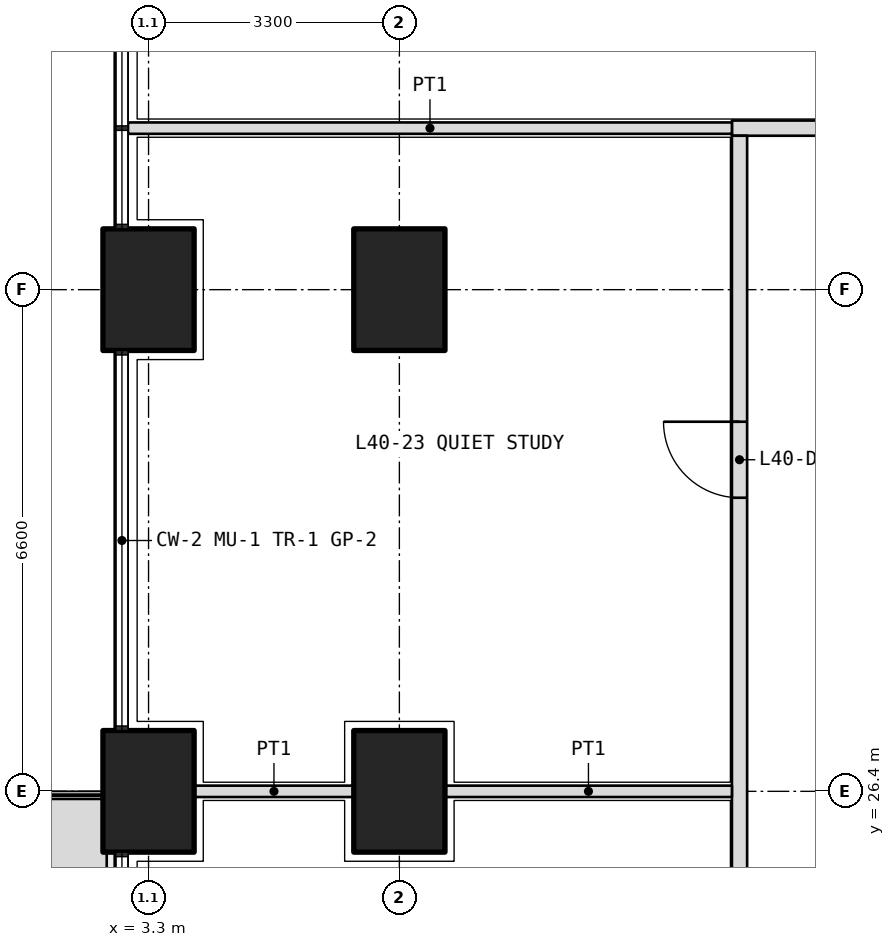
"""IFC4 building model, lengths in metres.
Left out: names, types, materials, properties, quantities, classifications, styles, units other than length and angle.
Written with IfcOpenShell. Run it as: python <this file> out.ifc"""

import sys

from ifc_helpers import new_model, si_unit, direction, frame, frame_2d, origin, origin_2d, place, context, subcontext, project, spatial, polyline, rectangle, outline, extrude, element, fill, save


model = new_model("IFC4")
c1 = context("Model", 3, precision=1e-05, world=origin(), true_north=direction((0.0, 1.0)))
c2 = subcontext(c1, "Body", "Model", "MODEL_VIEW")
j1 = project(units=[si_unit("LENGTHUNIT", "METRE"), si_unit("PLANEANGLEUNIT", "RADIAN")], contexts=[c1])
p1 = place(None, origin())
s1 = spatial("IfcSite", under=j1, at=p1, CompositionType="ELEMENT")
p2 = place(p1, origin())
s2 = spatial("IfcBuilding", under=s1, at=p2, CompositionType="ELEMENT")
p3 = place(p2, frame((0.0, 0.0, 176.7)))
s3 = spatial("IfcBuildingStorey", under=s2, at=p3, CompositionType="ELEMENT", Elevation=176.7)
for number, where, z_axis, x_axis in (
    (1, (3.3, 26.4, 0.0), (0.0, 0.0, 1.0), (0.0, 1.0, 0.0)),
    (2, (3.3, 33.0, 0.0), (0.0, 0.0, 1.0), (0.0, 1.0, 0.0)),
    (3, (6.6, 26.4, 0.0), (0.0, 0.0, 1.0), (0.0, 1.0, 0.0)),
    (4, (6.6, 33.0, 0.0), (0.0, 0.0, 1.0), (0.0, 1.0, 0.0)),
):
    element("IfcColumn", number, at=place(p3, frame(where, z_axis=z_axis, x_axis=x_axis)), inside=s3, PredefinedType="COLUMN", context=c2, shape_type="SweptSolid", body=[
        extrude(rectangle(XDim=1.6, YDim=1.2, at=origin_2d()), origin(), (0.0, 0.0, 1.0), 4.2),
    ])
p4 = place(p3, origin())
e5 = element("IfcWall", 5, at=p4, inside=s3, PredefinedType="USERDEFINED", context=c2, shape_type="SweptSolid", body=[
    extrude(outline(polyline([(1.75, 17.25), (2.75, 17.25), (2.75, 26.3), (1.75, 26.3), (1.75, 17.25)]), holes=[polyline([(1.9, 17.4), (2.6, 17.4), (2.6, 26.15), (1.9, 26.15), (1.9, 17.4)])]), origin(), (0.0, 0.0, 1.0), 1.05),
])
p5 = place(p3, frame((10.975, 35.125, 0.0), z_axis=(0.0, 0.0, 1.0), x_axis=(1.0, 0.0, 0.0)))
e6 = element("IfcWall", 6, at=p5, inside=s3, PredefinedType="PARTITIONING", context=c2, shape_type="SweptSolid", body=[
    extrude(rectangle(XDim=30.85, YDim=0.2, at=frame_2d((15.425, 0.0))), origin(), (0.0, 0.0, 1.0), 2.85),
])
p6 = place(p5, frame((2.312, 0.0, 0.0)))
e7 = element("IfcOpeningElement", 7, at=p6, cuts=e6, PredefinedType="OPENING", context=c2, shape_type="SweptSolid", body=[
    extrude(rectangle(XDim=1.0, YDim=2.1, at=frame_2d((0.5, 1.05))), frame((0.0, 0.11, 0.0), z_axis=(0.0, -1.0, 0.0), x_axis=(1.0, 0.0, 0.0)), (0.0, 0.0, 1.0), 0.22),
])
p7 = place(p5, frame((7.125, 0.0, 0.0)))
e8 = element("IfcOpeningElement", 8, at=p7, cuts=e6, PredefinedType="OPENING", context=c2, shape_type="SweptSolid", body=[
    extrude(rectangle(XDim=1.0, YDim=2.1, at=frame_2d((0.5, 1.05))), frame((0.0, 0.11, 0.0), z_axis=(0.0, -1.0, 0.0), x_axis=(1.0, 0.0, 0.0)), (0.0, 0.0, 1.0), 0.22),
])
p8 = place(p5, frame((10.425, 0.0, 0.0)))
e9 = element("IfcOpeningElement", 9, at=p8, cuts=e6, PredefinedType="OPENING", context=c2, shape_type="SweptSolid", body=[
    extrude(rectangle(XDim=1.0, YDim=2.1, at=frame_2d((0.5, 1.05))), frame((0.0, 0.11, 0.0), z_axis=(0.0, -1.0, 0.0), x_axis=(1.0, 0.0, 0.0)), (0.0, 0.0, 1.0), 0.22),
])
p9 = place(p5, frame((16.575, 0.0, 0.0)))
e10 = element("IfcOpeningElement", 10, at=p9, cuts=e6, PredefinedType="OPENING", context=c2, shape_type="SweptSolid", body=[
    extrude(rectangle(XDim=1.0, YDim=2.1, at=frame_2d((0.5, 1.05))), frame((0.0, 0.11, 0.0), z_axis=(0.0, -1.0, 0.0), x_axis=(1.0, 0.0, 0.0)), (0.0, 0.0, 1.0), 0.22),
])
p10 = place(p5, frame((25.887, 0.0, 0.0)))
e11 = element("IfcOpeningElement", 11, at=p10, cuts=e6, PredefinedType="OPENING", context=c2, shape_type="SweptSolid", body=[
    extrude(rectangle(XDim=1.0, YDim=2.1, at=frame_2d((0.5, 1.05))), frame((0.0, 0.11, 0.0), z_axis=(0.0, -1.0, 0.0), x_axis=(1.0, 0.0, 0.0)), (0.0, 0.0, 1.0), 0.22),
])
p11 = place(p3, frame((11.075, 11.175, 0.0), z_axis=(0.0, 0.0, 1.0), x_axis=(0.0, 1.0, 0.0)))
e12 = element("IfcWall", 12, at=p11, inside=s3, PredefinedType="PARTITIONING", context=c2, shape_type="SweptSolid", body=[
    extrude(rectangle(XDim=23.85, YDim=0.2, at=frame_2d((11.925, 0.0))), origin(), (0.0, 0.0, 1.0), 2.85),
])
p12 = place(p11, frame((0.462, 0.0, 0.0)))
e13 = element("IfcOpeningElement", 13, at=p12, cuts=e12, PredefinedType="OPENING", context=c2, shape_type="SweptSolid", body=[
    extrude(rectangle(XDim=1.0, YDim=2.1, at=frame_2d((0.5, 1.05))), frame((0.0, 0.11, 0.0), z_axis=(0.0, -1.0, 0.0), x_axis=(1.0, 0.0, 0.0)), (0.0, 0.0, 1.0), 0.22),
])
p13 = place(p11, frame((3.125, 0.0, 0.0)))
e14 = element("IfcOpeningElement", 14, at=p13, cuts=e12, PredefinedType="OPENING", context=c2, shape_type="SweptSolid", body=[
    extrude(rectangle(XDim=1.0, YDim=2.1, at=frame_2d((0.5, 1.05))), frame((0.0, 0.11, 0.0), z_axis=(0.0, -1.0, 0.0), x_axis=(1.0, 0.0, 0.0)), (0.0, 0.0, 1.0), 0.22),
])
p14 = place(p11, frame((6.475, 0.0, 0.0)))
e15 = element("IfcOpeningElement", 15, at=p14, cuts=e12, PredefinedType="OPENING", context=c2, shape_type="SweptSolid", body=[
    extrude(rectangle(XDim=0.9, YDim=2.1, at=frame_2d((0.45, 1.05))), frame((0.0, 0.11, 0.0), z_axis=(0.0, -1.0, 0.0), x_axis=(1.0, 0.0, 0.0)), (0.0, 0.0, 1.0), 0.22),
])
p15 = place(p11, frame((9.675, 0.0, 0.0)))
e16 = element("IfcOpeningElement", 16, at=p15, cuts=e12, PredefinedType="OPENING", context=c2, shape_type="SweptSolid", body=[
    extrude(rectangle(XDim=0.9, YDim=2.1, at=frame_2d((0.45, 1.05))), frame((0.0, 0.11, 0.0), z_axis=(0.0, -1.0, 0.0), x_axis=(1.0, 0.0, 0.0)), (0.0, 0.0, 1.0), 0.22),
])
p16 = place(p11, frame((12.925, 0.0, 0.0)))
e17 = element("IfcOpeningElement", 17, at=p16, cuts=e12, PredefinedType="OPENING", context=c2, shape_type="SweptSolid", body=[
    extrude(rectangle(XDim=1.0, YDim=2.1, at=frame_2d((0.5, 1.05))), frame((0.0, 0.11, 0.0), z_axis=(0.0, -1.0, 0.0), x_axis=(1.0, 0.0, 0.0)), (0.0, 0.0, 1.0), 0.22),
])
p17 = place(p11, frame((19.087, 0.0, 0.0)))
e18 = element("IfcOpeningElement", 18, at=p17, cuts=e12, PredefinedType="OPENING", context=c2, shape_type="SweptSolid", body=[
    extrude(rectangle(XDim=1.0, YDim=2.1, at=frame_2d((0.5, 1.05))), frame((0.0, 0.11, 0.0), z_axis=(0.0, -1.0, 0.0), x_axis=(1.0, 0.0, 0.0)), (0.0, 0.0, 1.0), 0.22),
])
p18 = place(p3, frame((3.03, 35.125, 0.0), z_axis=(0.0, 0.0, 1.0), x_axis=(1.0, 0.0, 0.0)))
e19 = element("IfcWall", 19, at=p18, inside=s3, PredefinedType="PARTITIONING", context=c2, shape_type="SweptSolid", body=[
    extrude(rectangle(XDim=7.945, YDim=0.15, at=frame_2d((3.973, 0.0))), origin(), (0.0, 0.0, 1.0), 2.7),
])
p19 = place(p3, frame((3.9, 26.4, 0.0), z_axis=(0.0, 0.0, 1.0), x_axis=(1.0, 0.0, 0.0)))
e20 = element("IfcWall", 20, at=p19, inside=s3, PredefinedType="PARTITIONING", context=c2, shape_type="SweptSolid", body=[
    extrude(rectangle(XDim=2.1, YDim=0.15, at=frame_2d((1.05, 0.0))), origin(), (0.0, 0.0, 1.0), 2.85),
])
p20 = place(p3, frame((7.2, 26.4, 0.0), z_axis=(0.0, 0.0, 1.0), x_axis=(1.0, 0.0, 0.0)))
e21 = element("IfcWall", 21, at=p20, inside=s3, PredefinedType="PARTITIONING", context=c2, shape_type="SweptSolid", body=[
    extrude(rectangle(XDim=3.775, YDim=0.15, at=frame_2d((1.888, 0.0))), origin(), (0.0, 0.0, 1.0), 2.85),
])
p21 = place(p17, origin())
e22 = element("IfcDoor", 22, at=p21, inside=s3, OperationType="SINGLE_SWING_RIGHT", PredefinedType="DOOR", context=c2, shape_type="SweptSolid", body=[
    extrude(rectangle(XDim=1.0, YDim=2.1, at=frame_2d((0.5, 1.05))), frame((0.0, 0.025, 0.0), z_axis=(0.0, -1.0, 0.0), x_axis=(1.0, 0.0, 0.0)), (0.0, 0.0, 1.0), 0.05),
])
fill(e18, e22)
save(model, sys.argv[1])
